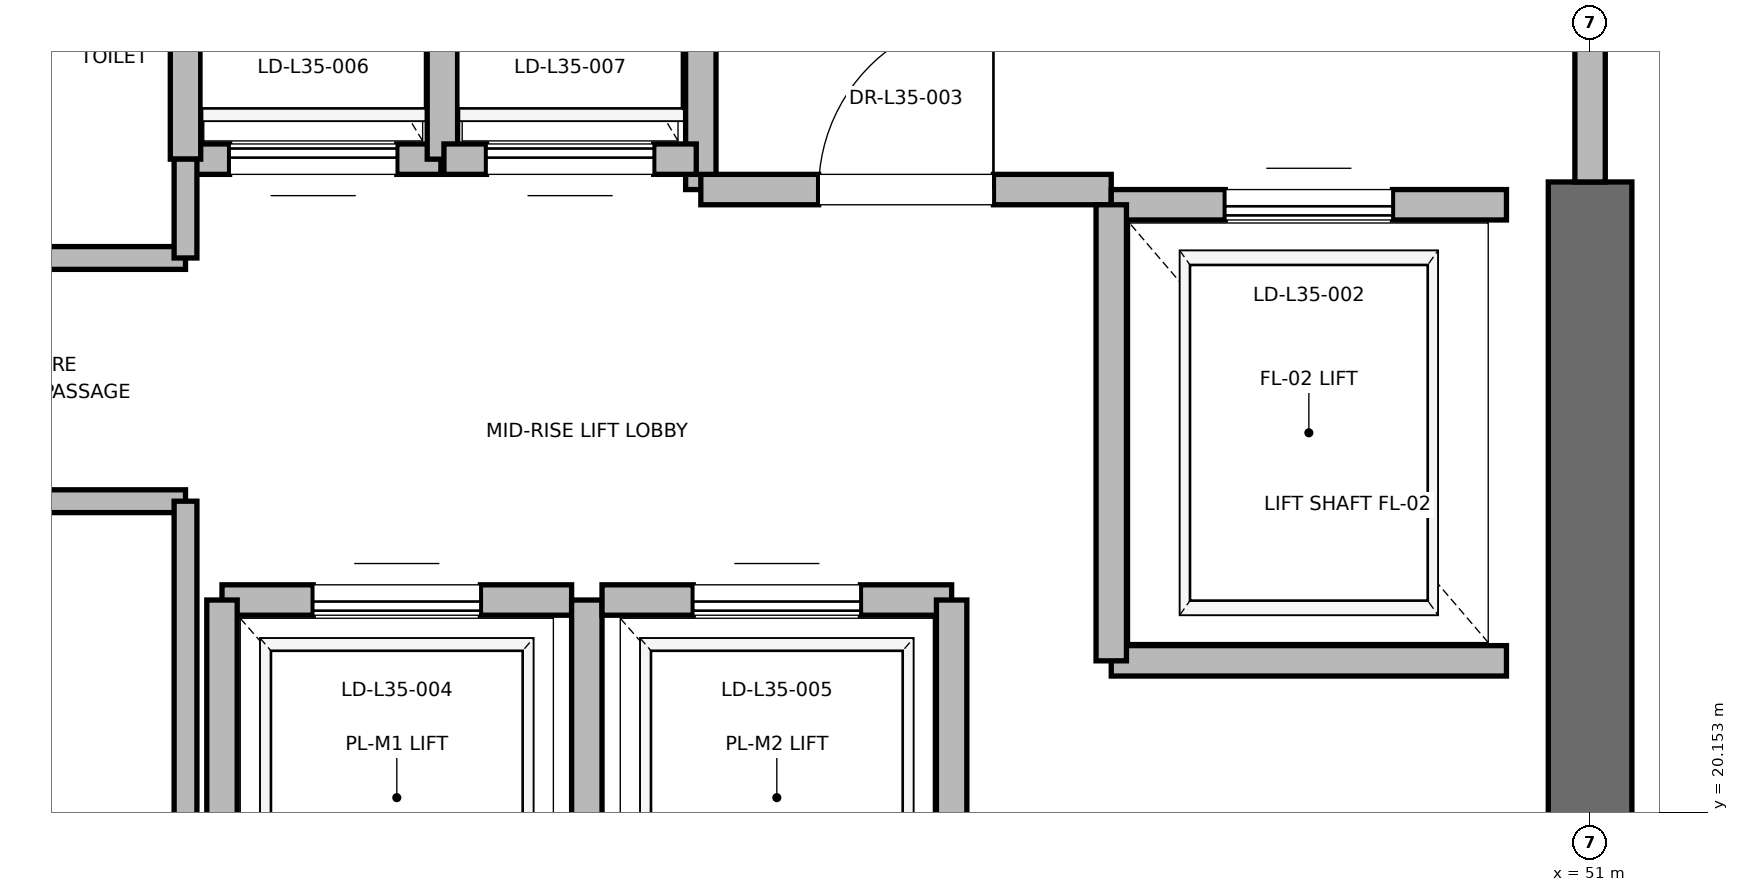
"""IFC4 building model, lengths in metres.
Left out: names, types, materials, properties, quantities, classifications, styles, units other than length and angle.
Written with IfcOpenShell. Run it as: python <this file> out.ifc"""

import sys

from ifc_helpers import new_model, si_unit, direction, frame, frame_2d, origin, place, context, subcontext, project, spatial, rectangle, extrude, element, fill, save


model = new_model("IFC4")
c1 = context("Model", 3, precision=1e-05, world=origin(), true_north=direction((0.0, 1.0)))
c2 = subcontext(c1, "Body", "Model", "MODEL_VIEW")
j1 = project(units=[si_unit("LENGTHUNIT", "METRE"), si_unit("PLANEANGLEUNIT", "RADIAN")], contexts=[c1])
p1 = place(None, origin())
s1 = spatial("IfcSite", under=j1, at=p1, CompositionType="ELEMENT")
p2 = place(p1, origin())
s2 = spatial("IfcBuilding", under=s1, at=p2, CompositionType="ELEMENT")
p3 = place(p2, frame((0.0, 0.0, 152.4)))
s3 = spatial("IfcBuildingStorey", under=s2, at=p3, CompositionType="ELEMENT", Elevation=152.4)
p4 = place(p3, frame((51.0, 18.5, 0.0), z_axis=(0.0, 0.0, 1.0), x_axis=(0.0, 1.0, 0.0)))
e1 = element("IfcWall", 1, at=p4, inside=s3, PredefinedType="SHEAR", context=c2, shape_type="SweptSolid", body=[
    extrude(rectangle(XDim=5.8, YDim=0.55, at=frame_2d((2.9, 0.0))), origin(), (0.0, 0.0, 1.0), 3.775),
])
p5 = place(p3, frame((45.15, 24.25, 0.0), z_axis=(0.0, 0.0, 1.0), x_axis=(0.0, 1.0, 0.0)))
e2 = element("IfcWall", 2, at=p5, inside=s3, PredefinedType="PARTITIONING", context=c2, shape_type="SweptSolid", body=[
    extrude(rectangle(XDim=3.37, YDim=0.2, at=frame_2d((1.685, 0.0))), origin(), (0.0, 0.0, 1.0), 3.775),
])
p6 = place(p3, frame((45.15, 24.25, 0.0), z_axis=(0.0, 0.0, 1.0), x_axis=(1.0, 0.0, 0.0)))
e3 = element("IfcWall", 3, at=p6, inside=s3, PredefinedType="PARTITIONING", context=c2, shape_type="SweptSolid", body=[
    extrude(rectangle(XDim=2.7, YDim=0.2, at=frame_2d((1.35, 0.0))), origin(), (0.0, 0.0, 1.0), 3.775),
])
p7 = place(p6, frame((0.775, 0.0, 0.0)))
e4 = element("IfcOpeningElement", 4, at=p7, cuts=e3, PredefinedType="OPENING", context=c2, shape_type="SweptSolid", body=[
    extrude(rectangle(XDim=1.15, YDim=2.2, at=frame_2d((0.575, 1.1))), frame((0.0, 0.1, 0.0), z_axis=(0.0, -1.0, 0.0), x_axis=(1.0, 0.0, 0.0)), (0.0, 0.0, 1.0), 0.2),
])
p8 = place(p3, frame((51.0, 24.3, 0.0), z_axis=(0.0, 0.0, 1.0), x_axis=(0.0, 1.0, 0.0)))
e5 = element("IfcWall", 5, at=p8, inside=s3, PredefinedType="PARTITIONING", context=c2, shape_type="SweptSolid", body=[
    extrude(rectangle(XDim=3.4, YDim=0.2, at=frame_2d((1.7, 0.0))), origin(), (0.0, 0.0, 1.0), 2.755),
])
p9 = place(p8, frame((1.125, 0.0, 0.0)))
e6 = element("IfcOpeningElement", 6, at=p9, cuts=e5, PredefinedType="OPENING", context=c2, shape_type="SweptSolid", body=[
    extrude(rectangle(XDim=1.15, YDim=2.2, at=frame_2d((0.575, 1.1))), frame((0.0, 0.1, 0.0), z_axis=(0.0, -1.0, 0.0), x_axis=(1.0, 0.0, 0.0)), (0.0, 0.0, 1.0), 0.2),
])
p10 = place(p3, frame((47.85, 21.15, 0.0), z_axis=(0.0, 0.0, 1.0), x_axis=(1.0, 0.0, 0.0)))
e7 = element("IfcWall", 7, at=p10, inside=s3, PredefinedType="SOLIDWALL", context=c2, shape_type="SweptSolid", body=[
    extrude(rectangle(XDim=2.6, YDim=0.2, at=frame_2d((1.3, 0.0))), origin(), (0.0, 0.0, 1.0), 3.775),
])
p11 = place(p3, frame((50.45, 24.15, 0.0), z_axis=(0.0, 0.0, 1.0), x_axis=(-1.0, 0.0, 0.0)))
e8 = element("IfcWall", 8, at=p11, inside=s3, PredefinedType="SOLIDWALL", context=c2, shape_type="SweptSolid", body=[
    extrude(rectangle(XDim=2.6, YDim=0.2, at=frame_2d((1.3, 0.0))), origin(), (0.0, 0.0, 1.0), 2.755),
])
p12 = place(p11, frame((0.75, 0.0, 0.0)))
e9 = element("IfcOpeningElement", 9, at=p12, cuts=e8, PredefinedType="OPENING", context=c2, shape_type="SweptSolid", body=[
    extrude(rectangle(XDim=1.1, YDim=2.2, at=frame_2d((0.55, 1.1))), frame((0.0, 0.1, 0.0), z_axis=(0.0, -1.0, 0.0), x_axis=(1.0, 0.0, 0.0)), (0.0, 0.0, 1.0), 0.2),
])
p13 = place(p3, frame((47.85, 24.15, 0.0), z_axis=(0.0, 0.0, 1.0), x_axis=(0.0, -1.0, 0.0)))
e10 = element("IfcWall", 10, at=p13, inside=s3, PredefinedType="SOLIDWALL", context=c2, shape_type="SweptSolid", body=[
    extrude(rectangle(XDim=3.0, YDim=0.2, at=frame_2d((1.5, 0.0))), origin(), (0.0, 0.0, 1.0), 3.775),
])
p14 = place(p3, frame((44.3, 21.55, 0.0), z_axis=(0.0, 0.0, 1.0), x_axis=(-1.0, 0.0, 0.0)))
e11 = element("IfcWall", 11, at=p14, inside=s3, PredefinedType="SOLIDWALL", context=c2, shape_type="SweptSolid", body=[
    extrude(rectangle(XDim=2.3, YDim=0.2, at=frame_2d((1.15, 0.0))), origin(), (0.0, 0.0, 1.0), 3.775),
])
p15 = place(p14, frame((0.6, 0.0, 0.0)))
e12 = element("IfcOpeningElement", 12, at=p15, cuts=e11, PredefinedType="OPENING", context=c2, shape_type="SweptSolid", body=[
    extrude(rectangle(XDim=1.1, YDim=2.2, at=frame_2d((0.55, 1.1))), frame((0.0, 0.1, 0.0), z_axis=(0.0, -1.0, 0.0), x_axis=(1.0, 0.0, 0.0)), (0.0, 0.0, 1.0), 0.2),
])
p16 = place(p3, frame((42.0, 21.55, 0.0), z_axis=(0.0, 0.0, 1.0), x_axis=(0.0, -1.0, 0.0)))
e13 = element("IfcWall", 13, at=p16, inside=s3, PredefinedType="SOLIDWALL", context=c2, shape_type="SweptSolid", body=[
    extrude(rectangle(XDim=2.6, YDim=0.2, at=frame_2d((1.3, 0.0))), origin(), (0.0, 0.0, 1.0), 2.755),
])
p17 = place(p3, frame((44.4, 18.95, 0.0), z_axis=(0.0, 0.0, 1.0), x_axis=(0.0, 1.0, 0.0)))
e14 = element("IfcWall", 14, at=p17, inside=s3, PredefinedType="SOLIDWALL", context=c2, shape_type="SweptSolid", body=[
    extrude(rectangle(XDim=2.6, YDim=0.2, at=frame_2d((1.3, 0.0))), origin(), (0.0, 0.0, 1.0), 3.775),
])
p18 = place(p3, frame((46.8, 21.55, 0.0), z_axis=(0.0, 0.0, 1.0), x_axis=(-1.0, 0.0, 0.0)))
e15 = element("IfcWall", 15, at=p18, inside=s3, PredefinedType="SOLIDWALL", context=c2, shape_type="SweptSolid", body=[
    extrude(rectangle(XDim=2.3, YDim=0.2, at=frame_2d((1.15, 0.0))), origin(), (0.0, 0.0, 1.0), 3.775),
])
p19 = place(p18, frame((0.6, 0.0, 0.0)))
e16 = element("IfcOpeningElement", 16, at=p19, cuts=e15, PredefinedType="OPENING", context=c2, shape_type="SweptSolid", body=[
    extrude(rectangle(XDim=1.1, YDim=2.2, at=frame_2d((0.55, 1.1))), frame((0.0, 0.1, 0.0), z_axis=(0.0, -1.0, 0.0), x_axis=(1.0, 0.0, 0.0)), (0.0, 0.0, 1.0), 0.2),
])
p20 = place(p3, frame((46.8, 18.95, 0.0), z_axis=(0.0, 0.0, 1.0), x_axis=(0.0, 1.0, 0.0)))
e17 = element("IfcWall", 17, at=p20, inside=s3, PredefinedType="SOLIDWALL", context=c2, shape_type="SweptSolid", body=[
    extrude(rectangle(XDim=2.6, YDim=0.2, at=frame_2d((1.3, 0.0))), origin(), (0.0, 0.0, 1.0), 3.775),
])
p21 = place(p3, frame((41.76, 24.45, 0.0), z_axis=(0.0, 0.0, 1.0), x_axis=(1.0, 0.0, 0.0)))
e18 = element("IfcWall", 18, at=p21, inside=s3, PredefinedType="SOLIDWALL", context=c2, shape_type="SweptSolid", body=[
    extrude(rectangle(XDim=1.68, YDim=0.2, at=frame_2d((0.84, 0.0))), origin(), (0.0, 0.0, 1.0), 3.775),
])
p22 = place(p21, frame((0.29, 0.0, 0.0)))
e19 = element("IfcOpeningElement", 19, at=p22, cuts=e18, PredefinedType="OPENING", context=c2, shape_type="SweptSolid", body=[
    extrude(rectangle(XDim=1.1, YDim=2.2, at=frame_2d((0.55, 1.1))), frame((0.0, 0.1, 0.0), z_axis=(0.0, -1.0, 0.0), x_axis=(1.0, 0.0, 0.0)), (0.0, 0.0, 1.0), 0.2),
])
for number, where, z_axis, x_axis in (
    (20, (41.76, 27.05, 0.0), (0.0, 0.0, 1.0), (0.0, -1.0, 0.0)),
    (21, (43.45, 24.45, 0.0), (0.0, 0.0, 1.0), (0.0, 1.0, 0.0)),
):
    element("IfcWall", number, at=place(p3, frame(where, z_axis=z_axis, x_axis=x_axis)), inside=s3, PredefinedType="SOLIDWALL", context=c2, shape_type="SweptSolid", body=[
        extrude(rectangle(XDim=2.6, YDim=0.2, at=frame_2d((1.3, 0.0))), origin(), (0.0, 0.0, 1.0), 3.775),
    ])
p23 = place(p3, frame((43.46, 24.45, 0.0), z_axis=(0.0, 0.0, 1.0), x_axis=(1.0, 0.0, 0.0)))
e22 = element("IfcWall", 22, at=p23, inside=s3, PredefinedType="SOLIDWALL", context=c2, shape_type="SweptSolid", body=[
    extrude(rectangle(XDim=1.66, YDim=0.2, at=frame_2d((0.83, 0.0))), origin(), (0.0, 0.0, 1.0), 3.775),
])
p24 = place(p23, frame((0.28, 0.0, 0.0)))
e23 = element("IfcOpeningElement", 23, at=p24, cuts=e22, PredefinedType="OPENING", context=c2, shape_type="SweptSolid", body=[
    extrude(rectangle(XDim=1.1, YDim=2.2, at=frame_2d((0.55, 1.1))), frame((0.0, 0.1, 0.0), z_axis=(0.0, -1.0, 0.0), x_axis=(1.0, 0.0, 0.0)), (0.0, 0.0, 1.0), 0.2),
])
for number, where, z_axis, x_axis in (
    (24, (39.95, 22.2, 0.0), (0.0, 0.0, 1.0), (1.0, 0.0, 0.0)),
    (25, (39.95, 23.8, 0.0), (0.0, 0.0, 1.0), (1.0, 0.0, 0.0)),
):
    element("IfcWall", number, at=place(p3, frame(where, z_axis=z_axis, x_axis=x_axis)), inside=s3, PredefinedType="PARTITIONING", context=c2, shape_type="SweptSolid", body=[
        extrude(rectangle(XDim=1.81, YDim=0.15, at=frame_2d((0.905, 0.0))), origin(), (0.0, 0.0, 1.0), 2.85),
    ])
p25 = place(p3, frame((41.76, 18.6, 0.0), z_axis=(0.0, 0.0, 1.0), x_axis=(0.0, 1.0, 0.0)))
e26 = element("IfcWall", 26, at=p25, inside=s3, PredefinedType="PARTITIONING", context=c2, shape_type="SweptSolid", body=[
    extrude(rectangle(XDim=3.6, YDim=0.15, at=frame_2d((1.8, 0.0))), origin(), (0.0, 0.0, 1.0), 2.755),
])
p26 = place(p3, frame((41.76, 23.8, 0.0), z_axis=(0.0, 0.0, 1.0), x_axis=(0.0, 1.0, 0.0)))
e27 = element("IfcWall", 27, at=p26, inside=s3, PredefinedType="PARTITIONING", context=c2, shape_type="SweptSolid", body=[
    extrude(rectangle(XDim=0.65, YDim=0.15, at=frame_2d((0.325, 0.0))), origin(), (0.0, 0.0, 1.0), 2.85),
])
p27 = place(p7, origin())
e28 = element("IfcDoor", 28, at=p27, inside=s3, OperationType="SINGLE_SWING_RIGHT", PredefinedType="DOOR", context=c2, shape_type="SweptSolid", body=[
    extrude(rectangle(XDim=1.15, YDim=2.2, at=frame_2d((0.575, 1.1))), frame((0.0, 0.025, 0.0), z_axis=(0.0, -1.0, 0.0), x_axis=(1.0, 0.0, 0.0)), (0.0, 0.0, 1.0), 0.05),
])
fill(e4, e28)
p28 = place(p12, origin())
e29 = element("IfcDoor", 29, at=p28, inside=s3, OperationType="SLIDING_TO_RIGHT", PredefinedType="DOOR", context=c2, shape_type="SweptSolid", body=[
    extrude(rectangle(XDim=1.1, YDim=2.2, at=frame_2d((0.55, 1.1))), frame((0.0, 0.025, 0.0), z_axis=(0.0, -1.0, 0.0), x_axis=(1.0, 0.0, 0.0)), (0.0, 0.0, 1.0), 0.05),
])
fill(e9, e29)
p29 = place(p15, origin())
e30 = element("IfcDoor", 30, at=p29, inside=s3, OperationType="SLIDING_TO_RIGHT", PredefinedType="DOOR", context=c2, shape_type="SweptSolid", body=[
    extrude(rectangle(XDim=1.1, YDim=2.2, at=frame_2d((0.55, 1.1))), frame((0.0, 0.025, 0.0), z_axis=(0.0, -1.0, 0.0), x_axis=(1.0, 0.0, 0.0)), (0.0, 0.0, 1.0), 0.05),
])
fill(e12, e30)
p30 = place(p19, origin())
e31 = element("IfcDoor", 31, at=p30, inside=s3, OperationType="SLIDING_TO_RIGHT", PredefinedType="DOOR", context=c2, shape_type="SweptSolid", body=[
    extrude(rectangle(XDim=1.1, YDim=2.2, at=frame_2d((0.55, 1.1))), frame((0.0, 0.025, 0.0), z_axis=(0.0, -1.0, 0.0), x_axis=(1.0, 0.0, 0.0)), (0.0, 0.0, 1.0), 0.05),
])
fill(e16, e31)
p31 = place(p22, origin())
e32 = element("IfcDoor", 32, at=p31, inside=s3, OperationType="SLIDING_TO_RIGHT", PredefinedType="DOOR", context=c2, shape_type="SweptSolid", body=[
    extrude(rectangle(XDim=1.1, YDim=2.2, at=frame_2d((0.55, 1.1))), frame((0.0, 0.025, 0.0), z_axis=(0.0, -1.0, 0.0), x_axis=(1.0, 0.0, 0.0)), (0.0, 0.0, 1.0), 0.05),
])
fill(e19, e32)
p32 = place(p24, origin())
e33 = element("IfcDoor", 33, at=p32, inside=s3, OperationType="SLIDING_TO_RIGHT", PredefinedType="DOOR", context=c2, shape_type="SweptSolid", body=[
    extrude(rectangle(XDim=1.1, YDim=2.2, at=frame_2d((0.55, 1.1))), frame((0.0, 0.025, 0.0), z_axis=(0.0, -1.0, 0.0), x_axis=(1.0, 0.0, 0.0)), (0.0, 0.0, 1.0), 0.05),
])
fill(e23, e33)
save(model, sys.argv[1])
